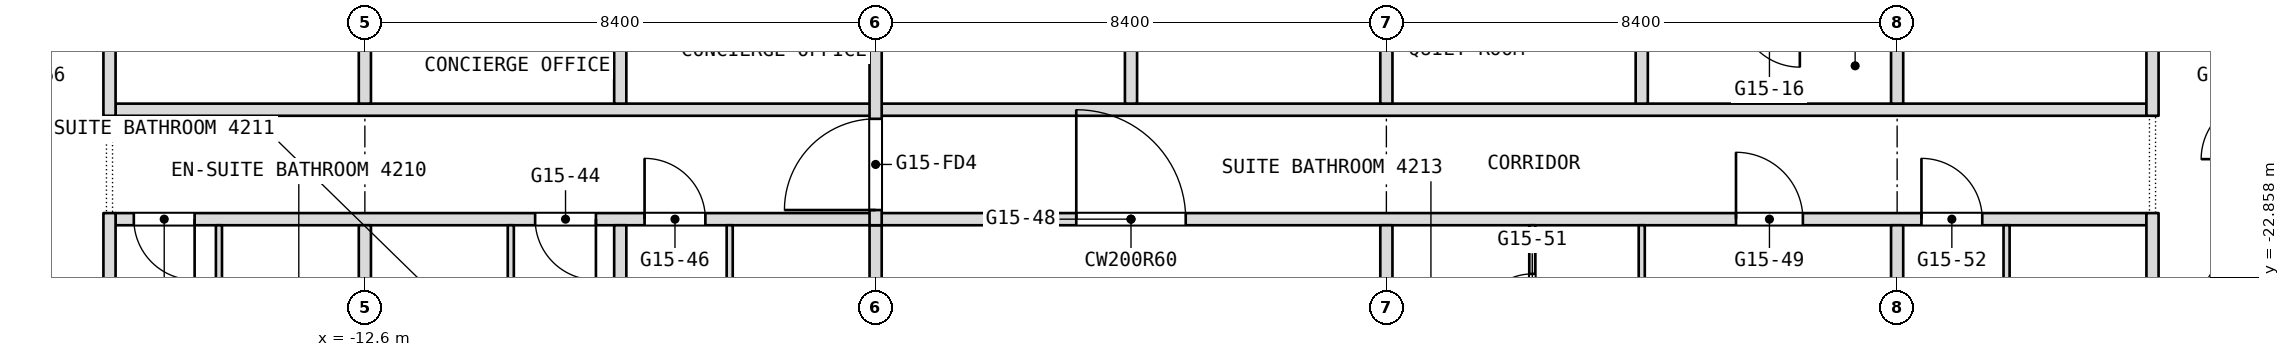
"""IFC4 building model, lengths in metres.
Left out: names, types, materials, properties, quantities, classifications, styles, units other than length and angle.
Written with IfcOpenShell. Run it as: python <this file> out.ifc"""

import sys

from ifc_helpers import new_model, si_unit, direction, frame, frame_2d, origin, place, context, subcontext, project, spatial, rectangle, extrude, element, fill, save


model = new_model("IFC4")
c1 = context("Model", 3, precision=1e-05, world=origin(), true_north=direction((0.0, 1.0)))
c2 = subcontext(c1, "Body", "Model", "MODEL_VIEW")
j1 = project(units=[si_unit("LENGTHUNIT", "METRE"), si_unit("PLANEANGLEUNIT", "RADIAN")], contexts=[c1])
p1 = place(None, origin())
s1 = spatial("IfcSite", under=j1, at=p1, CompositionType="ELEMENT")
p2 = place(p1, origin())
s2 = spatial("IfcBuilding", under=s1, at=p2, CompositionType="ELEMENT")
p3 = place(p2, frame((0.0, 0.0, 187.7)))
s3 = spatial("IfcBuildingStorey", under=s2, at=p3, CompositionType="ELEMENT", Elevation=187.7)
p4 = place(p3, frame((-16.7, -21.9, 0.0), z_axis=(0.0, 0.0, 1.0), x_axis=(1.0, 0.0, 0.0)))
e1 = element("IfcWall", 1, at=p4, inside=s3, PredefinedType="PARTITIONING", context=c2, shape_type="SweptSolid", body=[
    extrude(rectangle(XDim=33.4, YDim=0.2, at=frame_2d((16.7, 0.0))), origin(), (0.0, 0.0, 1.0), 3.34),
])
p5 = place(p4, frame((0.3, 0.0, 0.0)))
e2 = element("IfcOpeningElement", 2, at=p5, cuts=e1, PredefinedType="OPENING", context=c2, shape_type="SweptSolid", body=[
    extrude(rectangle(XDim=1.0, YDim=2.1, at=frame_2d((0.5, 1.05))), frame((0.0, 0.1, 0.0), z_axis=(0.0, -1.0, 0.0), x_axis=(1.0, 0.0, 0.0)), (0.0, 0.0, 1.0), 0.2),
])
p6 = place(p4, frame((6.9, 0.0, 0.0)))
e3 = element("IfcOpeningElement", 3, at=p6, cuts=e1, PredefinedType="OPENING", context=c2, shape_type="SweptSolid", body=[
    extrude(rectangle(XDim=1.0, YDim=2.1, at=frame_2d((0.5, 1.05))), frame((0.0, 0.1, 0.0), z_axis=(0.0, -1.0, 0.0), x_axis=(1.0, 0.0, 0.0)), (0.0, 0.0, 1.0), 0.2),
])
p7 = place(p4, frame((8.7, 0.0, 0.0)))
e4 = element("IfcOpeningElement", 4, at=p7, cuts=e1, PredefinedType="OPENING", context=c2, shape_type="SweptSolid", body=[
    extrude(rectangle(XDim=1.0, YDim=2.1, at=frame_2d((0.5, 1.05))), frame((0.0, 0.1, 0.0), z_axis=(0.0, -1.0, 0.0), x_axis=(1.0, 0.0, 0.0)), (0.0, 0.0, 1.0), 0.2),
])
p8 = place(p4, frame((15.8, 0.0, 0.0)))
e5 = element("IfcOpeningElement", 5, at=p8, cuts=e1, PredefinedType="OPENING", context=c2, shape_type="SweptSolid", body=[
    extrude(rectangle(XDim=1.8, YDim=2.1, at=frame_2d((0.9, 1.05))), frame((0.0, 0.1, 0.0), z_axis=(0.0, -1.0, 0.0), x_axis=(1.0, 0.0, 0.0)), (0.0, 0.0, 1.0), 0.2),
])
p9 = place(p4, frame((26.65, 0.0, 0.0)))
e6 = element("IfcOpeningElement", 6, at=p9, cuts=e1, PredefinedType="OPENING", context=c2, shape_type="SweptSolid", body=[
    extrude(rectangle(XDim=1.1, YDim=2.1, at=frame_2d((0.55, 1.05))), frame((0.0, 0.1, 0.0), z_axis=(0.0, -1.0, 0.0), x_axis=(1.0, 0.0, 0.0)), (0.0, 0.0, 1.0), 0.2),
])
p10 = place(p4, frame((29.7, 0.0, 0.0)))
e7 = element("IfcOpeningElement", 7, at=p10, cuts=e1, PredefinedType="OPENING", context=c2, shape_type="SweptSolid", body=[
    extrude(rectangle(XDim=1.0, YDim=2.1, at=frame_2d((0.5, 1.05))), frame((0.0, 0.1, 0.0), z_axis=(0.0, -1.0, 0.0), x_axis=(1.0, 0.0, 0.0)), (0.0, 0.0, 1.0), 0.2),
])
p11 = place(p3, frame((-16.7, -20.1, 0.0), z_axis=(0.0, 0.0, 1.0), x_axis=(1.0, 0.0, 0.0)))
e8 = element("IfcWall", 8, at=p11, inside=s3, PredefinedType="PARTITIONING", context=c2, shape_type="SweptSolid", body=[
    extrude(rectangle(XDim=33.4, YDim=0.2, at=frame_2d((16.7, 0.0))), origin(), (0.0, 0.0, 1.0), 3.34),
])
p12 = place(p3, frame((16.8, -27.229, 0.0), z_axis=(0.0, 0.0, 1.0), x_axis=(0.0, 1.0, 0.0)))
e9 = element("IfcWall", 9, at=p12, inside=s3, PredefinedType="PARTITIONING", context=c2, shape_type="SweptSolid", body=[
    extrude(rectangle(XDim=5.429, YDim=0.2, at=frame_2d((2.714, 0.0))), origin(), (0.0, 0.0, 1.0), 3.34),
])
p13 = place(p3, frame((16.8, -20.2, 0.0), z_axis=(0.0, 0.0, 1.0), x_axis=(0.0, 1.0, 0.0)))
e10 = element("IfcWall", 10, at=p13, inside=s3, PredefinedType="PARTITIONING", context=c2, shape_type="SweptSolid", body=[
    extrude(rectangle(XDim=6.8, YDim=0.2, at=frame_2d((3.4, 0.0))), origin(), (0.0, 0.0, 1.0), 3.34),
])
p14 = place(p3, frame((14.4, -25.85, 0.0), z_axis=(0.0, 0.0, 1.0), x_axis=(0.0, 1.0, 0.0)))
e11 = element("IfcWall", 11, at=p14, inside=s3, PredefinedType="PARTITIONING", context=c2, shape_type="SweptSolid", body=[
    extrude(rectangle(XDim=3.85, YDim=0.1, at=frame_2d((1.925, 0.0))), origin(), (0.0, 0.0, 1.0), 3.34),
])
p15 = place(p3, frame((12.6, -28.343, 0.0), z_axis=(0.0, 0.0, 1.0), x_axis=(0.0, 1.0, 0.0)))
e12 = element("IfcWall", 12, at=p15, inside=s3, PredefinedType="PARTITIONING", context=c2, shape_type="SweptSolid", body=[
    extrude(rectangle(XDim=6.343, YDim=0.2, at=frame_2d((3.171, 0.0))), origin(), (0.0, 0.0, 1.0), 3.34),
])
p16 = place(p3, frame((12.6, -20.0, 0.0), z_axis=(0.0, 0.0, 1.0), x_axis=(0.0, 1.0, 0.0)))
e13 = element("IfcWall", 13, at=p16, inside=s3, PredefinedType="PARTITIONING", context=c2, shape_type="SweptSolid", body=[
    extrude(rectangle(XDim=1.5, YDim=0.2, at=frame_2d((0.75, 0.0))), origin(), (0.0, 0.0, 1.0), 3.34),
])
p17 = place(p3, frame((8.4, -28.9, 0.0), z_axis=(0.0, 0.0, 1.0), x_axis=(0.0, 1.0, 0.0)))
e14 = element("IfcWall", 14, at=p17, inside=s3, PredefinedType="PARTITIONING", context=c2, shape_type="SweptSolid", body=[
    extrude(rectangle(XDim=6.9, YDim=0.1, at=frame_2d((3.45, 0.0))), origin(), (0.0, 0.0, 1.0), 3.34),
])
p18 = place(p17, frame((2.53, 0.0, 0.0)))
e15 = element("IfcOpeningElement", 15, at=p18, cuts=e14, PredefinedType="OPENING", context=c2, shape_type="SweptSolid", body=[
    extrude(rectangle(XDim=0.9, YDim=2.1, at=frame_2d((0.45, 1.05))), frame((0.0, 0.05, 0.0), z_axis=(0.0, -1.0, 0.0), x_axis=(1.0, 0.0, 0.0)), (0.0, 0.0, 1.0), 0.1),
])
p19 = place(p3, frame((8.4, -20.0, 0.0), z_axis=(0.0, 0.0, 1.0), x_axis=(0.0, 1.0, 0.0)))
e16 = element("IfcWall", 16, at=p19, inside=s3, PredefinedType="PARTITIONING", context=c2, shape_type="SweptSolid", body=[
    extrude(rectangle(XDim=1.5, YDim=0.2, at=frame_2d((0.75, 0.0))), origin(), (0.0, 0.0, 1.0), 3.34),
])
p20 = place(p3, frame((6.6, -24.55, 0.0), z_axis=(0.0, 0.0, 1.0), x_axis=(0.0, 1.0, 0.0)))
e17 = element("IfcWall", 17, at=p20, inside=s3, PredefinedType="PARTITIONING", context=c2, shape_type="SweptSolid", body=[
    extrude(rectangle(XDim=2.55, YDim=0.1, at=frame_2d((1.275, 0.0))), origin(), (0.0, 0.0, 1.0), 3.34),
])
p21 = place(p20, frame((0.85, 0.0, 0.0)))
e18 = element("IfcOpeningElement", 18, at=p21, cuts=e17, PredefinedType="OPENING", context=c2, shape_type="SweptSolid", body=[
    extrude(rectangle(XDim=0.9, YDim=2.1, at=frame_2d((0.45, 1.05))), frame((0.0, 0.05, 0.0), z_axis=(0.0, -1.0, 0.0), x_axis=(1.0, 0.0, 0.0)), (0.0, 0.0, 1.0), 0.1),
])
p22 = place(p3, frame((4.2, -28.9, 0.0), z_axis=(0.0, 0.0, 1.0), x_axis=(0.0, 1.0, 0.0)))
e19 = element("IfcWall", 19, at=p22, inside=s3, PredefinedType="PARTITIONING", context=c2, shape_type="SweptSolid", body=[
    extrude(rectangle(XDim=6.9, YDim=0.2, at=frame_2d((3.45, 0.0))), origin(), (0.0, 0.0, 1.0), 3.34),
])
for number, where, z_axis, x_axis in (
    (20, (4.2, -20.0, 0.0), (0.0, 0.0, 1.0), (0.0, 1.0, 0.0)),
    (21, (0.0, -20.0, 0.0), (0.0, 0.0, 1.0), (0.0, 1.0, 0.0)),
):
    element("IfcWall", number, at=place(p3, frame(where, z_axis=z_axis, x_axis=x_axis)), inside=s3, PredefinedType="PARTITIONING", context=c2, shape_type="SweptSolid", body=[
        extrude(rectangle(XDim=6.4, YDim=0.2, at=frame_2d((3.2, 0.0))), origin(), (0.0, 0.0, 1.0), 3.34),
    ])
p23 = place(p3, frame((-4.2, -28.9, 0.0), z_axis=(0.0, 0.0, 1.0), x_axis=(0.0, 1.0, 0.0)))
e22 = element("IfcWall", 22, at=p23, inside=s3, PredefinedType="PARTITIONING", context=c2, shape_type="SweptSolid", body=[
    extrude(rectangle(XDim=6.9, YDim=0.2, at=frame_2d((3.45, 0.0))), origin(), (0.0, 0.0, 1.0), 3.34),
])
p24 = place(p3, frame((-4.2, -22.0, 0.0), z_axis=(0.0, 0.0, 1.0), x_axis=(0.0, 1.0, 0.0)))
e23 = element("IfcWall", 23, at=p24, inside=s3, PredefinedType="PARTITIONING", context=c2, shape_type="SweptSolid", body=[
    extrude(rectangle(XDim=8.4, YDim=0.2, at=frame_2d((4.2, 0.0))), origin(), (0.0, 0.0, 1.0), 3.34),
])
p25 = place(p24, frame((0.25, 0.0, 0.0)))
e24 = element("IfcOpeningElement", 24, at=p25, cuts=e23, PredefinedType="OPENING", context=c2, shape_type="SweptSolid", body=[
    extrude(rectangle(XDim=1.5, YDim=2.1, at=frame_2d((0.75, 1.05))), frame((0.0, 0.1, 0.0), z_axis=(0.0, -1.0, 0.0), x_axis=(1.0, 0.0, 0.0)), (0.0, 0.0, 1.0), 0.2),
])
p26 = place(p3, frame((-6.6, -25.85, 0.0), z_axis=(0.0, 0.0, 1.0), x_axis=(0.0, 1.0, 0.0)))
e25 = element("IfcWall", 25, at=p26, inside=s3, PredefinedType="PARTITIONING", context=c2, shape_type="SweptSolid", body=[
    extrude(rectangle(XDim=3.85, YDim=0.1, at=frame_2d((1.925, 0.0))), origin(), (0.0, 0.0, 1.0), 3.34),
])
p27 = place(p3, frame((-8.4, -28.9, 0.0), z_axis=(0.0, 0.0, 1.0), x_axis=(0.0, 1.0, 0.0)))
e26 = element("IfcWall", 26, at=p27, inside=s3, PredefinedType="PARTITIONING", context=c2, shape_type="SweptSolid", body=[
    extrude(rectangle(XDim=6.9, YDim=0.2, at=frame_2d((3.45, 0.0))), origin(), (0.0, 0.0, 1.0), 3.34),
])
p28 = place(p3, frame((-8.4, -20.0, 0.0), z_axis=(0.0, 0.0, 1.0), x_axis=(0.0, 1.0, 0.0)))
e27 = element("IfcWall", 27, at=p28, inside=s3, PredefinedType="PARTITIONING", context=c2, shape_type="SweptSolid", body=[
    extrude(rectangle(XDim=1.5, YDim=0.2, at=frame_2d((0.75, 0.0))), origin(), (0.0, 0.0, 1.0), 3.34),
])
p29 = place(p3, frame((-10.2, -25.25, 0.0), z_axis=(0.0, 0.0, 1.0), x_axis=(0.0, 1.0, 0.0)))
e28 = element("IfcWall", 28, at=p29, inside=s3, PredefinedType="PARTITIONING", context=c2, shape_type="SweptSolid", body=[
    extrude(rectangle(XDim=3.25, YDim=0.1, at=frame_2d((1.625, 0.0))), origin(), (0.0, 0.0, 1.0), 3.34),
])
p30 = place(p3, frame((-12.6, -28.343, 0.0), z_axis=(0.0, 0.0, 1.0), x_axis=(0.0, 1.0, 0.0)))
e29 = element("IfcWall", 29, at=p30, inside=s3, PredefinedType="PARTITIONING", context=c2, shape_type="SweptSolid", body=[
    extrude(rectangle(XDim=6.343, YDim=0.2, at=frame_2d((3.171, 0.0))), origin(), (0.0, 0.0, 1.0), 3.34),
])
p31 = place(p3, frame((-12.6, -20.0, 0.0), z_axis=(0.0, 0.0, 1.0), x_axis=(0.0, 1.0, 0.0)))
e30 = element("IfcWall", 30, at=p31, inside=s3, PredefinedType="PARTITIONING", context=c2, shape_type="SweptSolid", body=[
    extrude(rectangle(XDim=1.5, YDim=0.2, at=frame_2d((0.75, 0.0))), origin(), (0.0, 0.0, 1.0), 3.34),
])
p32 = place(p3, frame((-15.0, -24.95, 0.0), z_axis=(0.0, 0.0, 1.0), x_axis=(0.0, 1.0, 0.0)))
e31 = element("IfcWall", 31, at=p32, inside=s3, PredefinedType="PARTITIONING", context=c2, shape_type="SweptSolid", body=[
    extrude(rectangle(XDim=2.95, YDim=0.1, at=frame_2d((1.475, 0.0))), origin(), (0.0, 0.0, 1.0), 3.34),
])
p33 = place(p3, frame((-16.8, -27.229, 0.0), z_axis=(0.0, 0.0, 1.0), x_axis=(0.0, 1.0, 0.0)))
e32 = element("IfcWall", 32, at=p33, inside=s3, PredefinedType="PARTITIONING", context=c2, shape_type="SweptSolid", body=[
    extrude(rectangle(XDim=5.429, YDim=0.2, at=frame_2d((2.714, 0.0))), origin(), (0.0, 0.0, 1.0), 3.34),
])
p34 = place(p3, frame((-16.8, -20.2, 0.0), z_axis=(0.0, 0.0, 1.0), x_axis=(0.0, 1.0, 0.0)))
e33 = element("IfcWall", 33, at=p34, inside=s3, PredefinedType="PARTITIONING", context=c2, shape_type="SweptSolid", body=[
    extrude(rectangle(XDim=6.8, YDim=0.2, at=frame_2d((3.4, 0.0))), origin(), (0.0, 0.0, 1.0), 3.34),
])
p35 = place(p5, origin())
e34 = element("IfcDoor", 34, at=p35, inside=s3, OperationType="SINGLE_SWING_RIGHT", PredefinedType="DOOR", context=c2, shape_type="SweptSolid", body=[
    extrude(rectangle(XDim=1.0, YDim=2.1, at=frame_2d((0.5, 1.05))), frame((0.0, 0.025, 0.0), z_axis=(0.0, -1.0, 0.0), x_axis=(1.0, 0.0, 0.0)), (0.0, 0.0, 1.0), 0.05),
])
fill(e2, e34)
p36 = place(p6, origin())
e35 = element("IfcDoor", 35, at=p36, inside=s3, OperationType="SINGLE_SWING_RIGHT", PredefinedType="DOOR", context=c2, shape_type="SweptSolid", body=[
    extrude(rectangle(XDim=1.0, YDim=2.1, at=frame_2d((0.5, 1.05))), frame((0.0, 0.025, 0.0), z_axis=(0.0, -1.0, 0.0), x_axis=(1.0, 0.0, 0.0)), (0.0, 0.0, 1.0), 0.05),
])
fill(e3, e35)
p37 = place(p7, origin())
e36 = element("IfcDoor", 36, at=p37, inside=s3, OperationType="SINGLE_SWING_RIGHT", PredefinedType="DOOR", context=c2, shape_type="SweptSolid", body=[
    extrude(rectangle(XDim=1.0, YDim=2.1, at=frame_2d((0.5, 1.05))), frame((0.0, 0.025, 0.0), z_axis=(0.0, -1.0, 0.0), x_axis=(1.0, 0.0, 0.0)), (0.0, 0.0, 1.0), 0.05),
])
fill(e4, e36)
p38 = place(p8, origin())
e37 = element("IfcDoor", 37, at=p38, inside=s3, OperationType="DOUBLE_DOOR_SINGLE_SWING", PredefinedType="DOOR", context=c2, shape_type="SweptSolid", body=[
    extrude(rectangle(XDim=1.8, YDim=2.1, at=frame_2d((0.9, 1.05))), frame((0.0, 0.025, 0.0), z_axis=(0.0, -1.0, 0.0), x_axis=(1.0, 0.0, 0.0)), (0.0, 0.0, 1.0), 0.05),
])
fill(e5, e37)
p39 = place(p9, origin())
e38 = element("IfcDoor", 38, at=p39, inside=s3, OperationType="SINGLE_SWING_LEFT", PredefinedType="DOOR", context=c2, shape_type="SweptSolid", body=[
    extrude(rectangle(XDim=1.1, YDim=2.1, at=frame_2d((0.55, 1.05))), frame((0.0, 0.025, 0.0), z_axis=(0.0, -1.0, 0.0), x_axis=(1.0, 0.0, 0.0)), (0.0, 0.0, 1.0), 0.05),
])
fill(e6, e38)
p40 = place(p10, origin())
e39 = element("IfcDoor", 39, at=p40, inside=s3, OperationType="SINGLE_SWING_RIGHT", PredefinedType="DOOR", context=c2, shape_type="SweptSolid", body=[
    extrude(rectangle(XDim=1.0, YDim=2.1, at=frame_2d((0.5, 1.05))), frame((0.0, 0.025, 0.0), z_axis=(0.0, -1.0, 0.0), x_axis=(1.0, 0.0, 0.0)), (0.0, 0.0, 1.0), 0.05),
])
fill(e7, e39)
p41 = place(p21, origin())
e40 = element("IfcDoor", 40, at=p41, inside=s3, OperationType="SINGLE_SWING_RIGHT", PredefinedType="DOOR", context=c2, shape_type="SweptSolid", body=[
    extrude(rectangle(XDim=0.9, YDim=2.1, at=frame_2d((0.45, 1.05))), frame((0.0, 0.025, 0.0), z_axis=(0.0, -1.0, 0.0), x_axis=(1.0, 0.0, 0.0)), (0.0, 0.0, 1.0), 0.05),
])
fill(e18, e40)
p42 = place(p25, origin())
e41 = element("IfcDoor", 41, at=p42, inside=s3, OperationType="DOUBLE_DOOR_DOUBLE_SWING", PredefinedType="DOOR", context=c2, shape_type="SweptSolid", body=[
    extrude(rectangle(XDim=1.5, YDim=2.1, at=frame_2d((0.75, 1.05))), frame((0.0, 0.025, 0.0), z_axis=(0.0, -1.0, 0.0), x_axis=(1.0, 0.0, 0.0)), (0.0, 0.0, 1.0), 0.05),
])
fill(e24, e41)
save(model, sys.argv[1])
